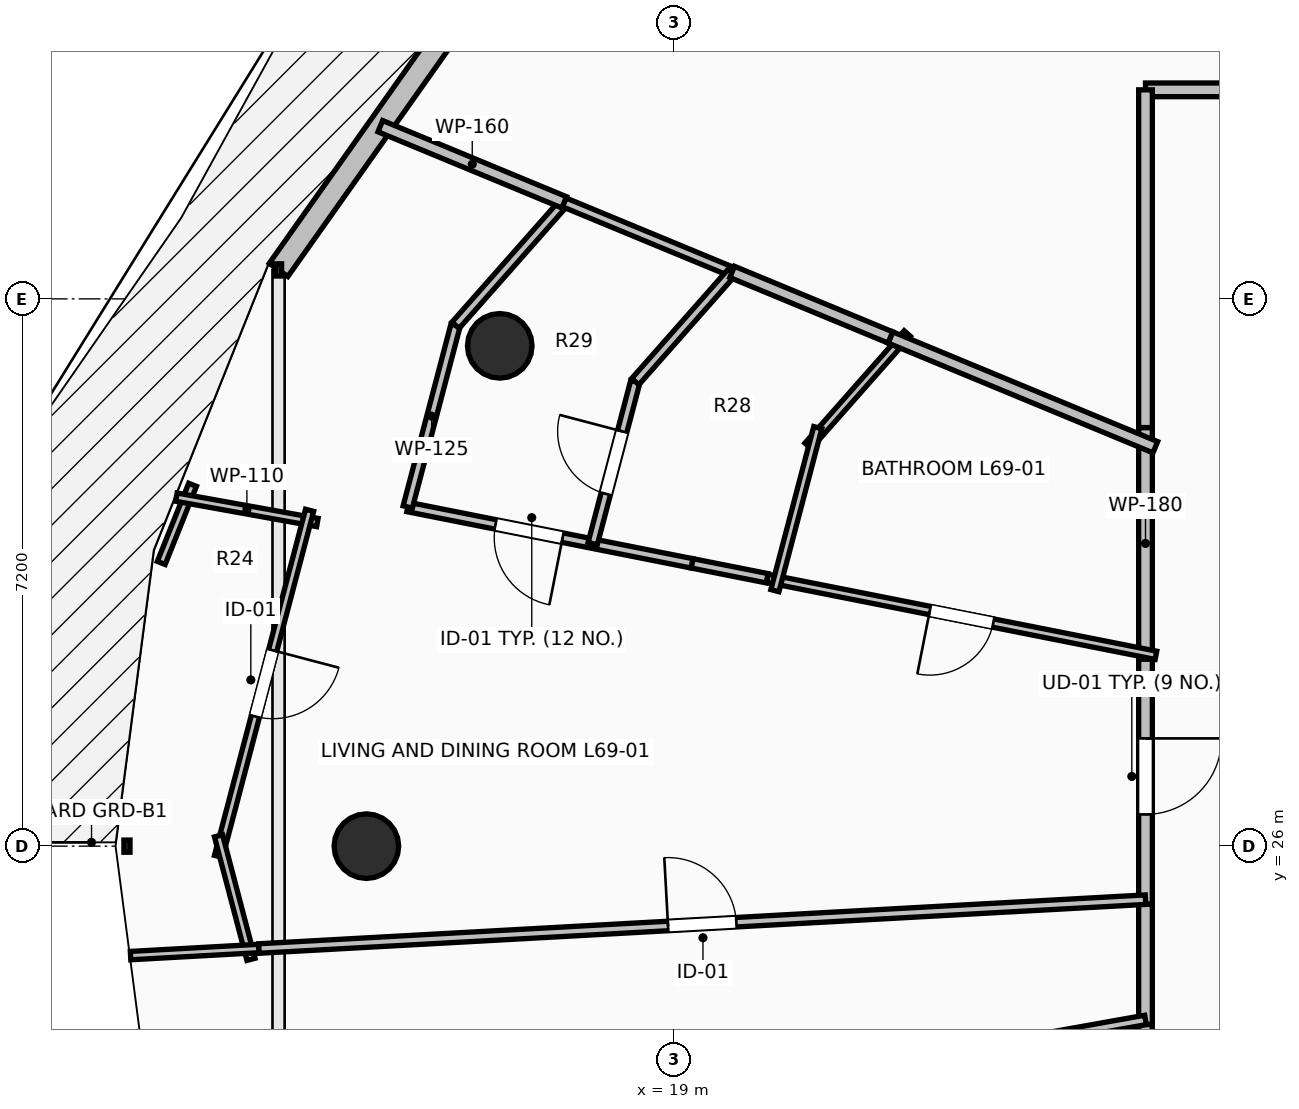
"""IFC4 building model, lengths in metres.
Left out: names, types, materials, properties, quantities, classifications, styles, units other than length and angle.
Written with IfcOpenShell. Run it as: python <this file> out.ifc"""

import sys

from ifc_helpers import new_model, si_unit, direction, frame, frame_2d, origin, origin_2d, place, context, subcontext, project, spatial, rectangle, circle, extrude, element, fill, save


model = new_model("IFC4")
c1 = context("Model", 3, precision=1e-05, world=origin(), true_north=direction((0.0, 1.0)))
c2 = subcontext(c1, "Body", "Model", "MODEL_VIEW")
j1 = project(units=[si_unit("LENGTHUNIT", "METRE"), si_unit("PLANEANGLEUNIT", "RADIAN")], contexts=[c1])
p1 = place(None, origin())
s1 = spatial("IfcSite", under=j1, at=p1, CompositionType="ELEMENT")
p2 = place(p1, origin())
s2 = spatial("IfcBuilding", under=s1, at=p2, CompositionType="ELEMENT")
p3 = place(p2, frame((0.0, 0.0, 255.55)))
s3 = spatial("IfcBuildingStorey", under=s2, at=p3, CompositionType="ELEMENT", Elevation=255.55)
for number, where, z_axis, x_axis in (
    (1, (16.705, 32.582, 0.0), (0.0, 0.0, 1.0), (-0.924, 0.383, 0.0)),
    (2, (14.95, 26.0, 0.0), (0.0, 0.0, 1.0), (-1.0, 0.0, 0.0)),
):
    element("IfcColumn", number, at=place(p3, frame(where, z_axis=z_axis, x_axis=x_axis)), inside=s3, PredefinedType="COLUMN", context=c2, shape_type="SweptSolid", body=[
        extrude(circle(Radius=0.425, at=origin_2d()), origin(), (0.0, 0.0, 1.0), 3.55),
    ])
p4 = place(p3, frame((16.216, 37.006, 0.0), z_axis=(0.0, 0.0, 1.0), x_axis=(-0.577261247247, -0.816559521668, 0.0)))
e3 = element("IfcWall", 3, at=p4, inside=s3, PredefinedType="STANDARD", context=c2, shape_type="SweptSolid", body=[
    extrude(rectangle(XDim=4.194, YDim=0.3, at=frame_2d((2.097, 0.0))), origin(), (0.0, 0.0, 1.0), 3.29),
])
p5 = place(p3, frame((25.2, 28.599, 0.0), z_axis=(0.0, 0.0, 1.0), x_axis=(0.0, -1.0, 0.0)))
e4 = element("IfcWall", 4, at=p5, inside=s3, PredefinedType="PARTITIONING", context=c2, shape_type="SweptSolid", body=[
    extrude(rectangle(XDim=3.363, YDim=0.18, at=frame_2d((1.682, 0.0))), origin(), (0.0, 0.0, 1.0), 2.482),
])
p6 = place(p5, frame((1.181, 0.0, 0.0)))
e5 = element("IfcOpeningElement", 5, at=p6, cuts=e4, PredefinedType="OPENING", context=c2, shape_type="SweptSolid", body=[
    extrude(rectangle(XDim=1.0, YDim=2.15, at=frame_2d((0.5, 1.075))), frame((0.0, 0.105, 0.0), z_axis=(0.0, -1.0, 0.0), x_axis=(1.0, 0.0, 0.0)), (0.0, 0.0, 1.0), 0.21),
])
p7 = place(p3, frame((25.2, 31.507, 0.0), z_axis=(0.0, 0.0, 1.0), x_axis=(0.0, -1.0, 0.0)))
e6 = element("IfcWall", 6, at=p7, inside=s3, PredefinedType="PARTITIONING", context=c2, shape_type="SweptSolid", body=[
    extrude(rectangle(XDim=3.048, YDim=0.18, at=frame_2d((1.524, 0.0))), origin(), (0.0, 0.0, 1.0), 2.482),
])
p8 = place(p3, frame((25.2, 25.236, 0.0), z_axis=(0.0, 0.0, 1.0), x_axis=(0.0, -1.0, 0.0)))
e7 = element("IfcWall", 7, at=p8, inside=s3, PredefinedType="PARTITIONING", context=c2, shape_type="SweptSolid", body=[
    extrude(rectangle(XDim=1.583, YDim=0.18, at=frame_2d((0.792, 0.0))), origin(), (0.0, 0.0, 1.0), 3.29),
])
p9 = place(p3, frame((25.2, 23.653, 0.0), z_axis=(0.0, 0.0, 1.0), x_axis=(0.0, -1.0, 0.0)))
e8 = element("IfcWall", 8, at=p9, inside=s3, PredefinedType="PARTITIONING", context=c2, shape_type="SweptSolid", body=[
    extrude(rectangle(XDim=1.654, YDim=0.18, at=frame_2d((0.827, 0.0))), origin(), (0.0, 0.0, 1.0), 3.29),
])
p10 = place(p9, frame((0.402, 0.0, 0.0)))
e9 = element("IfcOpeningElement", 9, at=p10, cuts=e8, PredefinedType="OPENING", context=c2, shape_type="SweptSolid", body=[
    extrude(rectangle(XDim=0.85, YDim=2.1, at=frame_2d((0.425, 1.05))), frame((0.0, 0.105, 0.0), z_axis=(0.0, -1.0, 0.0), x_axis=(1.0, 0.0, 0.0)), (0.0, 0.0, 1.0), 0.21),
])
p11 = place(p3, frame((33.814, 35.95, 0.0), z_axis=(0.0, 0.0, 1.0), x_axis=(-1.0, 0.0, 0.0)))
e10 = element("IfcWall", 10, at=p11, inside=s3, PredefinedType="PARTITIONING", context=c2, shape_type="SweptSolid", body=[
    extrude(rectangle(XDim=8.614, YDim=0.18, at=frame_2d((4.307, 0.0))), origin(), (0.0, 0.0, 1.0), 2.482),
])
p12 = place(p11, frame((3.807, 0.0, 0.0)))
e11 = element("IfcOpeningElement", 11, at=p12, cuts=e10, PredefinedType="OPENING", context=c2, shape_type="SweptSolid", body=[
    extrude(rectangle(XDim=1.0, YDim=2.15, at=frame_2d((0.5, 1.075))), frame((0.0, 0.105, 0.0), z_axis=(0.0, -1.0, 0.0), x_axis=(1.0, 0.0, 0.0)), (0.0, 0.0, 1.0), 0.21),
])
p13 = place(p3, frame((25.2, 35.95, 0.0), z_axis=(0.0, 0.0, 1.0), x_axis=(0.0, -1.0, 0.0)))
e12 = element("IfcWall", 12, at=p13, inside=s3, PredefinedType="PARTITIONING", context=c2, shape_type="SweptSolid", body=[
    extrude(rectangle(XDim=4.443, YDim=0.18, at=frame_2d((2.221, 0.0))), origin(), (0.0, 0.0, 1.0), 2.482),
])
p14 = place(p3, frame((19.236, 29.72, 0.0), z_axis=(0.0, 0.0, 1.0), x_axis=(-0.980906665774, 0.194479081243, 0.0)))
e13 = element("IfcWall", 13, at=p14, inside=s3, PredefinedType="PARTITIONING", context=c2, shape_type="SweptSolid", body=[
    extrude(rectangle(XDim=3.815, YDim=0.125, at=frame_2d((1.907, 0.0))), origin(), (0.0, 0.0, 1.0), 2.874),
])
p15 = place(p14, frame((1.737, 0.0, 0.0)))
e14 = element("IfcOpeningElement", 14, at=p15, cuts=e13, PredefinedType="OPENING", context=c2, shape_type="SweptSolid", body=[
    extrude(rectangle(XDim=0.9, YDim=2.1, at=frame_2d((0.45, 1.05))), frame((0.0, 0.077, 0.0), z_axis=(0.0, -1.0, 0.0), x_axis=(1.0, 0.0, 0.0)), (0.0, 0.0, 1.0), 0.155),
])
p16 = place(p3, frame((15.494, 30.462, 0.0), z_axis=(0.0, 0.0, 1.0), x_axis=(0.254459276467, 0.967083489995, 0.0)))
e15 = element("IfcWall", 15, at=p16, inside=s3, PredefinedType="PARTITIONING", context=c2, shape_type="SweptSolid", body=[
    extrude(rectangle(XDim=2.472, YDim=0.125, at=frame_2d((1.236, 0.0))), origin(), (0.0, 0.0, 1.0), 3.29),
])
p17 = place(p3, frame((16.123, 32.853, 0.0), z_axis=(0.0, 0.0, 1.0), x_axis=(0.662205183315, 0.749322557508, 0.0)))
e16 = element("IfcWall", 16, at=p17, inside=s3, PredefinedType="PARTITIONING", context=c2, shape_type="SweptSolid", body=[
    extrude(rectangle(XDim=2.158, YDim=0.125, at=frame_2d((1.079, 0.0))), origin(), (0.0, 0.0, 1.0), 3.29),
])
p18 = place(p3, frame((17.552, 34.47, 0.0), z_axis=(0.0, 0.0, 1.0), x_axis=(0.923932252837, -0.382556129434, 0.0)))
e17 = element("IfcWall", 17, at=p18, inside=s3, PredefinedType="PARTITIONING", context=c2, shape_type="SweptSolid", body=[
    extrude(rectangle(XDim=2.392, YDim=0.125, at=frame_2d((1.196, 0.0))), origin(), (0.0, 0.0, 1.0), 2.874),
])
p19 = place(p3, frame((25.337, 28.511, 0.0), z_axis=(0.0, 0.0, 1.0), x_axis=(-0.980930272027, 0.194359978959, 0.0)))
e18 = element("IfcWall", 18, at=p19, inside=s3, PredefinedType="PARTITIONING", context=c2, shape_type="SweptSolid", body=[
    extrude(rectangle(XDim=5.214, YDim=0.11, at=frame_2d((2.607, 0.0))), origin(), (0.0, 0.0, 1.0), 2.936),
])
p20 = place(p19, frame((2.182, 0.0, 0.0)))
e19 = element("IfcOpeningElement", 19, at=p20, cuts=e18, PredefinedType="OPENING", context=c2, shape_type="SweptSolid", body=[
    extrude(rectangle(XDim=0.85, YDim=2.1, at=frame_2d((0.425, 1.05))), frame((0.0, 0.07, 0.0), z_axis=(0.0, -1.0, 0.0), x_axis=(1.0, 0.0, 0.0)), (0.0, 0.0, 1.0), 0.14),
])
p21 = place(p3, frame((12.663, 30.754, 0.0), z_axis=(0.0, 0.0, 1.0), x_axis=(-0.372150787983, -0.928172285195, 0.0)))
e20 = element("IfcWall", 20, at=p21, inside=s3, PredefinedType="PARTITIONING", context=c2, shape_type="SweptSolid", body=[
    extrude(rectangle(XDim=1.107, YDim=0.11, at=frame_2d((0.554, 0.0))), origin(), (0.0, 0.0, 1.0), 3.29),
])
p22 = place(p3, frame((12.45, 30.592, 0.0), z_axis=(0.0, 0.0, 1.0), x_axis=(0.984212226867, -0.176992351488, 0.0)))
e21 = element("IfcWall", 21, at=p22, inside=s3, PredefinedType="PARTITIONING", context=c2, shape_type="SweptSolid", body=[
    extrude(rectangle(XDim=1.884, YDim=0.11, at=frame_2d((0.942, 0.0))), origin(), (0.0, 0.0, 1.0), 3.29),
])
p23 = place(p3, frame((14.203, 30.418, 0.0), z_axis=(0.0, 0.0, 1.0), x_axis=(-0.254460123068, -0.967083267236, 0.0)))
e22 = element("IfcWall", 22, at=p23, inside=s3, PredefinedType="PARTITIONING", context=c2, shape_type="SweptSolid", body=[
    extrude(rectangle(XDim=4.709, YDim=0.11, at=frame_2d((2.354, 0.0))), origin(), (0.0, 0.0, 1.0), 3.29),
])
p24 = place(p23, frame((1.904, 0.0, 0.0)))
e23 = element("IfcOpeningElement", 23, at=p24, cuts=e22, PredefinedType="OPENING", context=c2, shape_type="SweptSolid", body=[
    extrude(rectangle(XDim=0.9, YDim=2.1, at=frame_2d((0.45, 1.05))), frame((0.0, 0.07, 0.0), z_axis=(0.0, -1.0, 0.0), x_axis=(1.0, 0.0, 0.0)), (0.0, 0.0, 1.0), 0.14),
])
p25 = place(p3, frame((13.004, 26.135, 0.0), z_axis=(0.0, 0.0, 1.0), x_axis=(0.254278727694, -0.967130978018, 0.0)))
e24 = element("IfcWall", 24, at=p25, inside=s3, PredefinedType="PARTITIONING", context=c2, shape_type="SweptSolid", body=[
    extrude(rectangle(XDim=1.68, YDim=0.11, at=frame_2d((0.84, 0.0))), origin(), (0.0, 0.0, 1.0), 3.29),
])
p26 = place(p3, frame((13.536, 24.654, 0.0), z_axis=(0.0, 0.0, 1.0), x_axis=(-0.998470551828, -0.055286138695, 0.0)))
e25 = element("IfcWall", 25, at=p26, inside=s3, PredefinedType="PARTITIONING", context=c2, shape_type="SweptSolid", body=[
    extrude(rectangle(XDim=1.691, YDim=0.11, at=frame_2d((0.846, 0.0))), origin(), (0.0, 0.0, 1.0), 3.29),
])
p27 = place(p3, frame((20.223, 29.524, 0.0), z_axis=(0.0, 0.0, 1.0), x_axis=(-0.98086901598, 0.194668881667, 0.0)))
e26 = element("IfcWall", 26, at=p27, inside=s3, PredefinedType="PARTITIONING", context=c2, shape_type="SweptSolid", body=[
    extrude(rectangle(XDim=1.006, YDim=0.125, at=frame_2d((0.503, 0.0))), origin(), (0.0, 0.0, 1.0), 3.022),
])
p28 = place(p3, frame((13.536, 24.653, 0.0), z_axis=(0.0, 0.0, 1.0), x_axis=(0.998485968097, 0.055007013313, 0.0)))
e27 = element("IfcWall", 27, at=p28, inside=s3, PredefinedType="PARTITIONING", context=c2, shape_type="SweptSolid", body=[
    extrude(rectangle(XDim=11.682, YDim=0.125, at=frame_2d((5.841, 0.0))), origin(), (0.0, 0.0, 1.0), 2.874),
])
p29 = place(p28, frame((5.391, 0.0, 0.0)))
e28 = element("IfcOpeningElement", 28, at=p29, cuts=e27, PredefinedType="OPENING", context=c2, shape_type="SweptSolid", body=[
    extrude(rectangle(XDim=0.9, YDim=2.1, at=frame_2d((0.45, 1.05))), frame((0.0, 0.077, 0.0), z_axis=(0.0, -1.0, 0.0), x_axis=(1.0, 0.0, 0.0)), (0.0, 0.0, 1.0), 0.155),
])
p30 = place(p3, frame((17.552, 34.47, 0.0), z_axis=(0.0, 0.0, 1.0), x_axis=(-0.9239134198, 0.382601610965, 0.0)))
e29 = element("IfcWall", 29, at=p30, inside=s3, PredefinedType="PARTITIONING", context=c2, shape_type="SweptSolid", body=[
    extrude(rectangle(XDim=2.618, YDim=0.16, at=frame_2d((1.309, 0.0))), origin(), (0.0, 0.0, 1.0), 3.29),
])
p31 = place(p3, frame((17.927, 29.98, 0.0), z_axis=(0.0, 0.0, 1.0), x_axis=(0.254476946675, 0.967078840432, 0.0)))
e30 = element("IfcWall", 30, at=p31, inside=s3, PredefinedType="PARTITIONING", context=c2, shape_type="SweptSolid", body=[
    extrude(rectangle(XDim=2.205, YDim=0.125, at=frame_2d((1.102, 0.0))), origin(), (0.0, 0.0, 1.0), 2.482),
])
p32 = place(p31, frame((0.677, 0.0, 0.0)))
e31 = element("IfcOpeningElement", 31, at=p32, cuts=e30, PredefinedType="OPENING", context=c2, shape_type="SweptSolid", body=[
    extrude(rectangle(XDim=0.85, YDim=2.1, at=frame_2d((0.425, 1.05))), frame((0.0, 0.077, 0.0), z_axis=(0.0, -1.0, 0.0), x_axis=(1.0, 0.0, 0.0)), (0.0, 0.0, 1.0), 0.155),
])
p33 = place(p3, frame((18.488, 32.112, 0.0), z_axis=(0.0, 0.0, 1.0), x_axis=(0.661856531983, 0.749630529709, 0.0)))
e32 = element("IfcWall", 32, at=p33, inside=s3, PredefinedType="PARTITIONING", context=c2, shape_type="SweptSolid", body=[
    extrude(rectangle(XDim=1.925, YDim=0.125, at=frame_2d((0.962, 0.0))), origin(), (0.0, 0.0, 1.0), 2.482),
])
p34 = place(p3, frame((22.066, 32.744, 0.0), z_axis=(0.0, 0.0, 1.0), x_axis=(-0.662047420969, -0.749461948593, 0.0)))
e33 = element("IfcWall", 33, at=p34, inside=s3, PredefinedType="PARTITIONING", context=c2, shape_type="SweptSolid", body=[
    extrude(rectangle(XDim=1.972, YDim=0.11, at=frame_2d((0.986, 0.0))), origin(), (0.0, 0.0, 1.0), 3.29),
])
p35 = place(p3, frame((20.889, 31.506, 0.0), z_axis=(0.0, 0.0, 1.0), x_axis=(-0.254406599134, -0.967097348935, 0.0)))
e34 = element("IfcWall", 34, at=p35, inside=s3, PredefinedType="PARTITIONING", context=c2, shape_type="SweptSolid", body=[
    extrude(rectangle(XDim=2.218, YDim=0.11, at=frame_2d((1.109, 0.0))), origin(), (0.0, 0.0, 1.0), 2.482),
])
p36 = place(p3, frame((25.329, 31.248, 0.0), z_axis=(0.0, 0.0, 1.0), x_axis=(-0.923827524065, 0.382808967736, 0.0)))
e35 = element("IfcWall", 35, at=p36, inside=s3, PredefinedType="PARTITIONING", context=c2, shape_type="SweptSolid", body=[
    extrude(rectangle(XDim=3.773, YDim=0.16, at=frame_2d((1.886, 0.0))), origin(), (0.0, 0.0, 1.0), 2.936),
])
p37 = place(p3, frame((21.844, 32.693, 0.0), z_axis=(0.0, 0.0, 1.0), x_axis=(-0.92387949598, 0.382683520559, 0.0)))
e36 = element("IfcWall", 36, at=p37, inside=s3, PredefinedType="PARTITIONING", context=c2, shape_type="SweptSolid", body=[
    extrude(rectangle(XDim=2.253, YDim=0.16, at=frame_2d((1.127, 0.0))), origin(), (0.0, 0.0, 1.0), 3.022),
])
p38 = place(p3, frame((12.577, 21.46, 0.0), z_axis=(0.0, 0.0, 1.0), x_axis=(0.984427104809, 0.175793274383, 0.0)))
e37 = element("IfcWall", 37, at=p38, inside=s3, PredefinedType="PARTITIONING", context=c2, shape_type="SweptSolid", body=[
    extrude(rectangle(XDim=12.823, YDim=0.125, at=frame_2d((6.411, 0.0))), origin(), (0.0, 0.0, 1.0), 2.874),
])
p39 = place(p6, origin())
e38 = element("IfcDoor", 38, at=p39, inside=s3, OperationType="SINGLE_SWING_LEFT", PredefinedType="DOOR", context=c2, shape_type="SweptSolid", body=[
    extrude(rectangle(XDim=1.0, YDim=2.15, at=frame_2d((0.5, 1.075))), frame((0.0, 0.025, 0.0), z_axis=(0.0, -1.0, 0.0), x_axis=(1.0, 0.0, 0.0)), (0.0, 0.0, 1.0), 0.05),
])
fill(e5, e38)
p40 = place(p15, origin())
e39 = element("IfcDoor", 39, at=p40, inside=s3, OperationType="SINGLE_SWING_LEFT", PredefinedType="DOOR", context=c2, shape_type="SweptSolid", body=[
    extrude(rectangle(XDim=0.9, YDim=2.1, at=frame_2d((0.45, 1.05))), frame((0.0, 0.025, 0.0), z_axis=(0.0, -1.0, 0.0), x_axis=(1.0, 0.0, 0.0)), (0.0, 0.0, 1.0), 0.05),
])
fill(e14, e39)
p41 = place(p20, origin())
e40 = element("IfcDoor", 40, at=p41, inside=s3, OperationType="SINGLE_SWING_RIGHT", PredefinedType="DOOR", context=c2, shape_type="SweptSolid", body=[
    extrude(rectangle(XDim=0.85, YDim=2.1, at=frame_2d((0.425, 1.05))), frame((0.0, 0.025, 0.0), z_axis=(0.0, -1.0, 0.0), x_axis=(1.0, 0.0, 0.0)), (0.0, 0.0, 1.0), 0.05),
])
fill(e19, e40)
p42 = place(p24, origin())
e41 = element("IfcDoor", 41, at=p42, inside=s3, OperationType="SINGLE_SWING_LEFT", PredefinedType="DOOR", context=c2, shape_type="SweptSolid", body=[
    extrude(rectangle(XDim=0.9, YDim=2.1, at=frame_2d((0.45, 1.05))), frame((0.0, 0.025, 0.0), z_axis=(0.0, -1.0, 0.0), x_axis=(1.0, 0.0, 0.0)), (0.0, 0.0, 1.0), 0.05),
])
fill(e23, e41)
p43 = place(p29, origin())
e42 = element("IfcDoor", 42, at=p43, inside=s3, OperationType="SINGLE_SWING_LEFT", PredefinedType="DOOR", context=c2, shape_type="SweptSolid", body=[
    extrude(rectangle(XDim=0.9, YDim=2.1, at=frame_2d((0.45, 1.05))), frame((0.0, 0.025, 0.0), z_axis=(0.0, -1.0, 0.0), x_axis=(1.0, 0.0, 0.0)), (0.0, 0.0, 1.0), 0.05),
])
fill(e28, e42)
p44 = place(p32, origin())
e43 = element("IfcDoor", 43, at=p44, inside=s3, OperationType="SINGLE_SWING_RIGHT", PredefinedType="DOOR", context=c2, shape_type="SweptSolid", body=[
    extrude(rectangle(XDim=0.85, YDim=2.1, at=frame_2d((0.425, 1.05))), frame((0.0, 0.025, 0.0), z_axis=(0.0, -1.0, 0.0), x_axis=(1.0, 0.0, 0.0)), (0.0, 0.0, 1.0), 0.05),
])
fill(e31, e43)
save(model, sys.argv[1])
